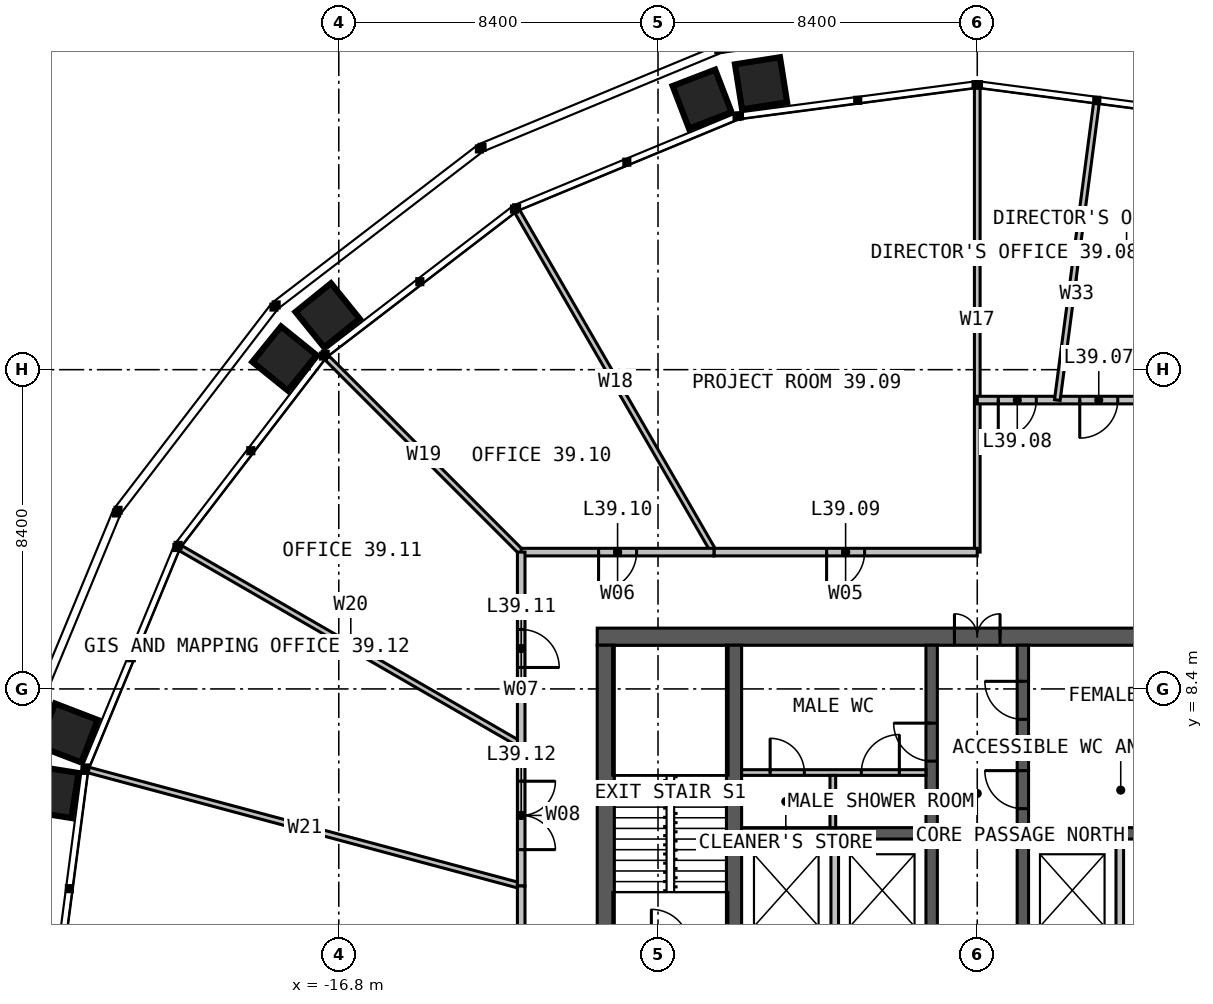
"""IFC4 building model, lengths in metres.
Left out: names, types, materials, properties, quantities, classifications, styles, units other than length and angle.
Written with IfcOpenShell. Run it as: python <this file> out.ifc"""

import sys

from ifc_helpers import new_model, si_unit, direction, frame, frame_2d, origin, place, context, subcontext, project, spatial, rectangle, extrude, element, fill, save


model = new_model("IFC4")
c1 = context("Model", 3, precision=1e-05, world=origin(), true_north=direction((0.0, 1.0)))
c2 = subcontext(c1, "Body", "Model", "MODEL_VIEW")
j1 = project(units=[si_unit("LENGTHUNIT", "METRE"), si_unit("PLANEANGLEUNIT", "RADIAN")], contexts=[c1])
p1 = place(None, origin())
s1 = spatial("IfcSite", under=j1, at=p1, CompositionType="ELEMENT")
p2 = place(p1, origin())
s2 = spatial("IfcBuilding", under=s1, at=p2, CompositionType="ELEMENT")
p3 = place(p2, frame((0.0, 0.0, 163.0)))
s3 = spatial("IfcBuildingStorey", under=s2, at=p3, CompositionType="ELEMENT", Elevation=163.0)
p4 = place(p3, frame((-10.0, 9.775, 0.0), z_axis=(0.0, 0.0, 1.0), x_axis=(1.0, 0.0, 0.0)))
e1 = element("IfcWall", 1, at=p4, inside=s3, PredefinedType="SOLIDWALL", context=c2, shape_type="SweptSolid", body=[
    extrude(rectangle(XDim=20.0, YDim=0.45, at=frame_2d((10.0, 0.0))), origin(), (0.0, 0.0, 1.0), 4.0),
])
p5 = place(p4, frame((9.4, 0.0, 0.0)))
e2 = element("IfcOpeningElement", 2, at=p5, cuts=e1, PredefinedType="OPENING", context=c2, shape_type="SweptSolid", body=[
    extrude(rectangle(XDim=1.2, YDim=2.2, at=frame_2d((0.6, 1.1))), frame((0.0, 0.235, 0.0), z_axis=(0.0, -1.0, 0.0), x_axis=(1.0, 0.0, 0.0)), (0.0, 0.0, 1.0), 0.47),
])
p6 = place(p3, frame((-9.775, 9.55, 0.0), z_axis=(0.0, 0.0, 1.0), x_axis=(0.0, -1.0, 0.0)))
e3 = element("IfcWall", 3, at=p6, inside=s3, PredefinedType="SOLIDWALL", context=c2, shape_type="SweptSolid", body=[
    extrude(rectangle(XDim=19.1, YDim=0.45, at=frame_2d((9.55, 0.0))), origin(), (0.0, 0.0, 1.0), 4.0),
])
p7 = place(p3, frame((-6.4, -9.55, 0.0), z_axis=(0.0, 0.0, 1.0), x_axis=(0.0, 1.0, 0.0)))
e4 = element("IfcWall", 4, at=p7, inside=s3, PredefinedType="SOLIDWALL", context=c2, shape_type="SweptSolid", body=[
    extrude(rectangle(XDim=19.1, YDim=0.4, at=frame_2d((9.55, 0.0))), origin(), (0.0, 0.0, 1.0), 4.0),
])
p8 = place(p7, frame((9.05, 0.0, 0.0)))
e5 = element("IfcOpeningElement", 5, at=p8, cuts=e4, PredefinedType="OPENING", context=c2, shape_type="SweptSolid", body=[
    extrude(rectangle(XDim=1.0, YDim=2.2, at=frame_2d((0.5, 1.1))), frame((0.0, 0.21, 0.0), z_axis=(0.0, -1.0, 0.0), x_axis=(1.0, 0.0, 0.0)), (0.0, 0.0, 1.0), 0.42),
])
for number, where, z_axis, x_axis in (
    (6, (-6.2, 4.6, 0.0), (0.0, 0.0, 1.0), (1.0, 0.0, 0.0)),
    (7, (1.35, 4.6, 0.0), (0.0, 0.0, 1.0), (1.0, 0.0, 0.0)),
):
    element("IfcWall", number, at=place(p3, frame(where, z_axis=z_axis, x_axis=x_axis)), inside=s3, PredefinedType="SOLIDWALL", context=c2, shape_type="SweptSolid", body=[
        extrude(rectangle(XDim=4.85, YDim=0.3, at=frame_2d((2.425, 0.0))), origin(), (0.0, 0.0, 1.0), 4.0),
    ])
p9 = place(p3, frame((-1.2, 1.45, 0.0), z_axis=(0.0, 0.0, 1.0), x_axis=(0.0, 1.0, 0.0)))
e8 = element("IfcWall", 8, at=p9, inside=s3, PredefinedType="SOLIDWALL", context=c2, shape_type="SweptSolid", body=[
    extrude(rectangle(XDim=8.1, YDim=0.3, at=frame_2d((4.05, 0.0))), origin(), (0.0, 0.0, 1.0), 4.0),
])
p10 = place(p9, frame((5.05, 0.0, 0.0)))
e9 = element("IfcOpeningElement", 9, at=p10, cuts=e8, PredefinedType="OPENING", context=c2, shape_type="SweptSolid", body=[
    extrude(rectangle(XDim=1.0, YDim=2.2, at=frame_2d((0.5, 1.1))), frame((0.0, 0.16, 0.0), z_axis=(0.0, -1.0, 0.0), x_axis=(1.0, 0.0, 0.0)), (0.0, 0.0, 1.0), 0.32),
])
p11 = place(p3, frame((1.2, 1.45, 0.0), z_axis=(0.0, 0.0, 1.0), x_axis=(0.0, 1.0, 0.0)))
e10 = element("IfcWall", 10, at=p11, inside=s3, PredefinedType="SOLIDWALL", context=c2, shape_type="SweptSolid", body=[
    extrude(rectangle(XDim=8.1, YDim=0.3, at=frame_2d((4.05, 0.0))), origin(), (0.0, 0.0, 1.0), 4.0),
])
p12 = place(p11, frame((3.8, 0.0, 0.0)))
e11 = element("IfcOpeningElement", 11, at=p12, cuts=e10, PredefinedType="OPENING", context=c2, shape_type="SweptSolid", body=[
    extrude(rectangle(XDim=1.0, YDim=2.2, at=frame_2d((0.5, 1.1))), frame((0.0, 0.16, 0.0), z_axis=(0.0, -1.0, 0.0), x_axis=(1.0, 0.0, 0.0)), (0.0, 0.0, 1.0), 0.32),
])
p13 = place(p11, frame((6.15, 0.0, 0.0)))
e12 = element("IfcOpeningElement", 12, at=p13, cuts=e10, PredefinedType="OPENING", context=c2, shape_type="SweptSolid", body=[
    extrude(rectangle(XDim=1.0, YDim=2.2, at=frame_2d((0.5, 1.1))), frame((0.0, 0.16, 0.0), z_axis=(0.0, -1.0, 0.0), x_axis=(1.0, 0.0, 0.0)), (0.0, 0.0, 1.0), 0.32),
])
for number, where, z_axis, x_axis in (
    (13, (-3.75, 1.75, 0.0), (0.0, 0.0, 1.0), (0.0, 1.0, 0.0)),
    (14, (3.75, 1.75, 0.0), (0.0, 0.0, 1.0), (0.0, 1.0, 0.0)),
):
    element("IfcWall", number, at=place(p3, frame(where, z_axis=z_axis, x_axis=x_axis)), inside=s3, PredefinedType="SOLIDWALL", context=c2, shape_type="SweptSolid", body=[
        extrude(rectangle(XDim=2.7, YDim=0.2, at=frame_2d((1.35, 0.0))), origin(), (0.0, 0.0, 1.0), 3.75),
    ])
p14 = place(p3, frame((1.35, 6.8, 0.0), z_axis=(0.0, 0.0, 1.0), x_axis=(1.0, 0.0, 0.0)))
e15 = element("IfcWall", 15, at=p14, inside=s3, PredefinedType="PARTITIONING", context=c2, shape_type="SweptSolid", body=[
    extrude(rectangle(XDim=4.85, YDim=0.15, at=frame_2d((2.425, 0.0))), origin(), (0.0, 0.0, 1.0), 3.75),
])
p15 = place(p3, frame((-6.2, 6.2, 0.0), z_axis=(0.0, 0.0, 1.0), x_axis=(1.0, 0.0, 0.0)))
e16 = element("IfcWall", 16, at=p15, inside=s3, PredefinedType="PARTITIONING", context=c2, shape_type="SweptSolid", body=[
    extrude(rectangle(XDim=4.85, YDim=0.15, at=frame_2d((2.425, 0.0))), origin(), (0.0, 0.0, 1.0), 3.75),
])
p16 = place(p15, frame((3.15, 0.0, 0.0)))
e17 = element("IfcOpeningElement", 17, at=p16, cuts=e16, PredefinedType="OPENING", context=c2, shape_type="SweptSolid", body=[
    extrude(rectangle(XDim=1.0, YDim=2.2, at=frame_2d((0.5, 1.1))), frame((0.0, 0.085, 0.0), z_axis=(0.0, -1.0, 0.0), x_axis=(1.0, 0.0, 0.0)), (0.0, 0.0, 1.0), 0.17),
])
p17 = place(p15, frame((0.75, 0.0, 0.0)))
e18 = element("IfcOpeningElement", 18, at=p17, cuts=e16, PredefinedType="OPENING", context=c2, shape_type="SweptSolid", body=[
    extrude(rectangle(XDim=0.9, YDim=2.2, at=frame_2d((0.45, 1.1))), frame((0.0, 0.085, 0.0), z_axis=(0.0, -1.0, 0.0), x_axis=(1.0, 0.0, 0.0)), (0.0, 0.0, 1.0), 0.17),
])
p18 = place(p3, frame((-3.8, 4.75, 0.0), z_axis=(0.0, 0.0, 1.0), x_axis=(0.0, 1.0, 0.0)))
e19 = element("IfcWall", 19, at=p18, inside=s3, PredefinedType="PARTITIONING", context=c2, shape_type="SweptSolid", body=[
    extrude(rectangle(XDim=1.375, YDim=0.15, at=frame_2d((0.688, 0.0))), origin(), (0.0, 0.0, 1.0), 3.75),
])
p19 = place(p3, frame((0.0, 12.0, 0.0), z_axis=(0.0, 0.0, 1.0), x_axis=(0.0, 1.0, 0.0)))
e20 = element("IfcWall", 20, at=p19, inside=s3, PredefinedType="PARTITIONING", context=c2, shape_type="SweptSolid", body=[
    extrude(rectangle(XDim=12.211, YDim=0.15, at=frame_2d((6.105, 0.0))), origin(), (0.0, 0.0, 1.0), 2.79),
])
p20 = place(p3, frame((-6.928, 12.0, 0.0), z_axis=(0.0, 0.0, 1.0), x_axis=(-0.500006140648, 0.86602185845, 0.0)))
e21 = element("IfcWall", 21, at=p20, inside=s3, PredefinedType="PARTITIONING", context=c2, shape_type="SweptSolid", body=[
    extrude(rectangle(XDim=10.355, YDim=0.15, at=frame_2d((5.177, 0.0))), origin(), (0.0, 0.0, 1.0), 2.79),
])
p21 = place(p3, frame((-12.0, 12.0, 0.0), z_axis=(0.0, 0.0, 1.0), x_axis=(-0.707106781187, 0.707106781187, 0.0)))
e22 = element("IfcWall", 22, at=p21, inside=s3, PredefinedType="PARTITIONING", context=c2, shape_type="SweptSolid", body=[
    extrude(rectangle(XDim=7.24, YDim=0.15, at=frame_2d((3.62, 0.0))), origin(), (0.0, 0.0, 1.0), 2.79),
])
p22 = place(p3, frame((-12.0, 6.928, 0.0), z_axis=(0.0, 0.0, 1.0), x_axis=(-0.86602185845, 0.500006140648, 0.0)))
e23 = element("IfcWall", 23, at=p22, inside=s3, PredefinedType="PARTITIONING", context=c2, shape_type="SweptSolid", body=[
    extrude(rectangle(XDim=10.355, YDim=0.15, at=frame_2d((5.177, 0.0))), origin(), (0.0, 0.0, 1.0), 2.79),
])
p23 = place(p3, frame((-12.0, 3.215, 0.0), z_axis=(0.0, 0.0, 1.0), x_axis=(-0.965923829901, 0.25882649561, 0.0)))
e24 = element("IfcWall", 24, at=p23, inside=s3, PredefinedType="PARTITIONING", context=c2, shape_type="SweptSolid", body=[
    extrude(rectangle(XDim=11.788, YDim=0.15, at=frame_2d((5.894, 0.0))), origin(), (0.0, 0.0, 1.0), 2.79),
])
p24 = place(p3, frame((9.238, 16.0, 0.0), z_axis=(0.0, 0.0, 1.0), x_axis=(-1.0, 0.0, 0.0)))
e25 = element("IfcWall", 25, at=p24, inside=s3, PredefinedType="PARTITIONING", context=c2, shape_type="SweptSolid", body=[
    extrude(rectangle(XDim=9.238, YDim=0.2, at=frame_2d((4.619, 0.0))), origin(), (0.0, 0.0, 1.0), 3.8),
])
p25 = place(p24, frame((0.805, 0.0, 0.0)))
e26 = element("IfcOpeningElement", 26, at=p25, cuts=e25, PredefinedType="OPENING", context=c2, shape_type="SweptSolid", body=[
    extrude(rectangle(XDim=1.0, YDim=2.2, at=frame_2d((0.5, 1.1))), frame((0.0, 0.11, 0.0), z_axis=(0.0, -1.0, 0.0), x_axis=(1.0, 0.0, 0.0)), (0.0, 0.0, 1.0), 0.22),
])
p26 = place(p24, frame((3.28, 0.0, 0.0)))
e27 = element("IfcOpeningElement", 27, at=p26, cuts=e25, PredefinedType="OPENING", context=c2, shape_type="SweptSolid", body=[
    extrude(rectangle(XDim=1.0, YDim=2.2, at=frame_2d((0.5, 1.1))), frame((0.0, 0.11, 0.0), z_axis=(0.0, -1.0, 0.0), x_axis=(1.0, 0.0, 0.0)), (0.0, 0.0, 1.0), 0.22),
])
p27 = place(p24, frame((5.541, 0.0, 0.0)))
e28 = element("IfcOpeningElement", 28, at=p27, cuts=e25, PredefinedType="OPENING", context=c2, shape_type="SweptSolid", body=[
    extrude(rectangle(XDim=1.0, YDim=2.2, at=frame_2d((0.5, 1.1))), frame((0.0, 0.11, 0.0), z_axis=(0.0, -1.0, 0.0), x_axis=(1.0, 0.0, 0.0)), (0.0, 0.0, 1.0), 0.22),
])
p28 = place(p24, frame((7.684, 0.0, 0.0)))
e29 = element("IfcOpeningElement", 29, at=p28, cuts=e25, PredefinedType="OPENING", context=c2, shape_type="SweptSolid", body=[
    extrude(rectangle(XDim=1.0, YDim=2.2, at=frame_2d((0.5, 1.1))), frame((0.0, 0.11, 0.0), z_axis=(0.0, -1.0, 0.0), x_axis=(1.0, 0.0, 0.0)), (0.0, 0.0, 1.0), 0.22),
])
p29 = place(p3, frame((2.106, 16.0, 0.0), z_axis=(0.0, 0.0, 1.0), x_axis=(0.130510712839, 0.99144689915, 0.0)))
e30 = element("IfcWall", 30, at=p29, inside=s3, PredefinedType="PARTITIONING", context=c2, shape_type="SweptSolid", body=[
    extrude(rectangle(XDim=7.866, YDim=0.15, at=frame_2d((3.933, 0.0))), origin(), (0.0, 0.0, 1.0), 2.79),
])
p30 = place(p3, frame((0.0, 12.0, 0.0), z_axis=(0.0, 0.0, 1.0), x_axis=(-1.0, 0.0, 0.0)))
e31 = element("IfcWall", 31, at=p30, inside=s3, PredefinedType="PARTITIONING", context=c2, shape_type="SweptSolid", body=[
    extrude(rectangle(XDim=6.928, YDim=0.2, at=frame_2d((3.464, 0.0))), origin(), (0.0, 0.0, 1.0), 3.8),
])
p31 = place(p30, frame((2.964, 0.0, 0.0)))
e32 = element("IfcOpeningElement", 32, at=p31, cuts=e31, PredefinedType="OPENING", context=c2, shape_type="SweptSolid", body=[
    extrude(rectangle(XDim=1.0, YDim=2.2, at=frame_2d((0.5, 1.1))), frame((0.0, 0.11, 0.0), z_axis=(0.0, -1.0, 0.0), x_axis=(1.0, 0.0, 0.0)), (0.0, 0.0, 1.0), 0.22),
])
p32 = place(p3, frame((-6.928, 12.0, 0.0), z_axis=(0.0, 0.0, 1.0), x_axis=(-1.0, 0.0, 0.0)))
e33 = element("IfcWall", 33, at=p32, inside=s3, PredefinedType="PARTITIONING", context=c2, shape_type="SweptSolid", body=[
    extrude(rectangle(XDim=5.072, YDim=0.2, at=frame_2d((2.536, 0.0))), origin(), (0.0, 0.0, 1.0), 3.8),
])
p33 = place(p32, frame((2.036, 0.0, 0.0)))
e34 = element("IfcOpeningElement", 34, at=p33, cuts=e33, PredefinedType="OPENING", context=c2, shape_type="SweptSolid", body=[
    extrude(rectangle(XDim=1.0, YDim=2.2, at=frame_2d((0.5, 1.1))), frame((0.0, 0.11, 0.0), z_axis=(0.0, -1.0, 0.0), x_axis=(1.0, 0.0, 0.0)), (0.0, 0.0, 1.0), 0.22),
])
p34 = place(p3, frame((-12.0, 12.0, 0.0), z_axis=(0.0, 0.0, 1.0), x_axis=(0.0, -1.0, 0.0)))
e35 = element("IfcWall", 35, at=p34, inside=s3, PredefinedType="PARTITIONING", context=c2, shape_type="SweptSolid", body=[
    extrude(rectangle(XDim=5.072, YDim=0.2, at=frame_2d((2.536, 0.0))), origin(), (0.0, 0.0, 1.0), 3.8),
])
p35 = place(p34, frame((2.036, 0.0, 0.0)))
e36 = element("IfcOpeningElement", 36, at=p35, cuts=e35, PredefinedType="OPENING", context=c2, shape_type="SweptSolid", body=[
    extrude(rectangle(XDim=1.0, YDim=2.2, at=frame_2d((0.5, 1.1))), frame((0.0, 0.11, 0.0), z_axis=(0.0, -1.0, 0.0), x_axis=(1.0, 0.0, 0.0)), (0.0, 0.0, 1.0), 0.22),
])
p36 = place(p3, frame((-12.0, 6.928, 0.0), z_axis=(0.0, 0.0, 1.0), x_axis=(0.0, -1.0, 0.0)))
e37 = element("IfcWall", 37, at=p36, inside=s3, PredefinedType="PARTITIONING", context=c2, shape_type="SweptSolid", body=[
    extrude(rectangle(XDim=3.713, YDim=0.2, at=frame_2d((1.856, 0.0))), origin(), (0.0, 0.0, 1.0), 3.8),
])
p37 = place(p36, frame((0.956, 0.0, 0.0)))
e38 = element("IfcOpeningElement", 38, at=p37, cuts=e37, PredefinedType="OPENING", context=c2, shape_type="SweptSolid", body=[
    extrude(rectangle(XDim=1.8, YDim=2.2, at=frame_2d((0.9, 1.1))), frame((0.0, 0.11, 0.0), z_axis=(0.0, -1.0, 0.0), x_axis=(1.0, 0.0, 0.0)), (0.0, 0.0, 1.0), 0.22),
])
p38 = place(p3, frame((-12.0, 3.215, 0.0), z_axis=(0.0, 0.0, 1.0), x_axis=(0.0, -1.0, 0.0)))
e39 = element("IfcWall", 39, at=p38, inside=s3, PredefinedType="PARTITIONING", context=c2, shape_type="SweptSolid", body=[
    extrude(rectangle(XDim=10.144, YDim=0.2, at=frame_2d((5.072, 0.0))), origin(), (0.0, 0.0, 1.0), 3.8),
])
p39 = place(p38, frame((4.172, 0.0, 0.0)))
e40 = element("IfcOpeningElement", 40, at=p39, cuts=e39, PredefinedType="OPENING", context=c2, shape_type="SweptSolid", body=[
    extrude(rectangle(XDim=1.8, YDim=2.2, at=frame_2d((0.9, 1.1))), frame((0.0, 0.11, 0.0), z_axis=(0.0, -1.0, 0.0), x_axis=(1.0, 0.0, 0.0)), (0.0, 0.0, 1.0), 0.22),
])
p40 = place(p5, origin())
e41 = element("IfcDoor", 41, at=p40, inside=s3, OperationType="DOUBLE_DOOR_SINGLE_SWING", PredefinedType="DOOR", context=c2, shape_type="SweptSolid", body=[
    extrude(rectangle(XDim=1.2, YDim=2.2, at=frame_2d((0.6, 1.1))), frame((0.0, 0.025, 0.0), z_axis=(0.0, -1.0, 0.0), x_axis=(1.0, 0.0, 0.0)), (0.0, 0.0, 1.0), 0.05),
])
fill(e2, e41)
p41 = place(p10, origin())
e42 = element("IfcDoor", 42, at=p41, inside=s3, OperationType="SINGLE_SWING_RIGHT", PredefinedType="DOOR", context=c2, shape_type="SweptSolid", body=[
    extrude(rectangle(XDim=1.0, YDim=2.2, at=frame_2d((0.5, 1.1))), frame((0.0, 0.025, 0.0), z_axis=(0.0, -1.0, 0.0), x_axis=(1.0, 0.0, 0.0)), (0.0, 0.0, 1.0), 0.05),
])
fill(e9, e42)
p42 = place(p12, origin())
e43 = element("IfcDoor", 43, at=p42, inside=s3, OperationType="SINGLE_SWING_RIGHT", PredefinedType="DOOR", context=c2, shape_type="SweptSolid", body=[
    extrude(rectangle(XDim=1.0, YDim=2.2, at=frame_2d((0.5, 1.1))), frame((0.0, 0.025, 0.0), z_axis=(0.0, -1.0, 0.0), x_axis=(1.0, 0.0, 0.0)), (0.0, 0.0, 1.0), 0.05),
])
fill(e11, e43)
p43 = place(p13, origin())
e44 = element("IfcDoor", 44, at=p43, inside=s3, OperationType="SINGLE_SWING_RIGHT", PredefinedType="DOOR", context=c2, shape_type="SweptSolid", body=[
    extrude(rectangle(XDim=1.0, YDim=2.2, at=frame_2d((0.5, 1.1))), frame((0.0, 0.025, 0.0), z_axis=(0.0, -1.0, 0.0), x_axis=(1.0, 0.0, 0.0)), (0.0, 0.0, 1.0), 0.05),
])
fill(e12, e44)
p44 = place(p16, origin())
e45 = element("IfcDoor", 45, at=p44, inside=s3, OperationType="SINGLE_SWING_RIGHT", PredefinedType="DOOR", context=c2, shape_type="SweptSolid", body=[
    extrude(rectangle(XDim=1.0, YDim=2.2, at=frame_2d((0.5, 1.1))), frame((0.0, 0.025, 0.0), z_axis=(0.0, -1.0, 0.0), x_axis=(1.0, 0.0, 0.0)), (0.0, 0.0, 1.0), 0.05),
])
fill(e17, e45)
p45 = place(p17, origin())
e46 = element("IfcDoor", 46, at=p45, inside=s3, OperationType="SINGLE_SWING_LEFT", PredefinedType="DOOR", context=c2, shape_type="SweptSolid", body=[
    extrude(rectangle(XDim=0.9, YDim=2.2, at=frame_2d((0.45, 1.1))), frame((0.0, 0.025, 0.0), z_axis=(0.0, -1.0, 0.0), x_axis=(1.0, 0.0, 0.0)), (0.0, 0.0, 1.0), 0.05),
])
fill(e18, e46)
p46 = place(p27, origin())
e47 = element("IfcDoor", 47, at=p46, inside=s3, OperationType="SINGLE_SWING_RIGHT", PredefinedType="DOOR", context=c2, shape_type="SweptSolid", body=[
    extrude(rectangle(XDim=1.0, YDim=2.2, at=frame_2d((0.5, 1.1))), frame((0.0, 0.025, 0.0), z_axis=(0.0, -1.0, 0.0), x_axis=(1.0, 0.0, 0.0)), (0.0, 0.0, 1.0), 0.05),
])
fill(e28, e47)
p47 = place(p28, origin())
e48 = element("IfcDoor", 48, at=p47, inside=s3, OperationType="SINGLE_SWING_RIGHT", PredefinedType="DOOR", context=c2, shape_type="SweptSolid", body=[
    extrude(rectangle(XDim=1.0, YDim=2.2, at=frame_2d((0.5, 1.1))), frame((0.0, 0.025, 0.0), z_axis=(0.0, -1.0, 0.0), x_axis=(1.0, 0.0, 0.0)), (0.0, 0.0, 1.0), 0.05),
])
fill(e29, e48)
p48 = place(p31, origin())
e49 = element("IfcDoor", 49, at=p48, inside=s3, OperationType="SINGLE_SWING_RIGHT", PredefinedType="DOOR", context=c2, shape_type="SweptSolid", body=[
    extrude(rectangle(XDim=1.0, YDim=2.2, at=frame_2d((0.5, 1.1))), frame((0.0, 0.025, 0.0), z_axis=(0.0, -1.0, 0.0), x_axis=(1.0, 0.0, 0.0)), (0.0, 0.0, 1.0), 0.05),
])
fill(e32, e49)
p49 = place(p33, origin())
e50 = element("IfcDoor", 50, at=p49, inside=s3, OperationType="SINGLE_SWING_RIGHT", PredefinedType="DOOR", context=c2, shape_type="SweptSolid", body=[
    extrude(rectangle(XDim=1.0, YDim=2.2, at=frame_2d((0.5, 1.1))), frame((0.0, 0.025, 0.0), z_axis=(0.0, -1.0, 0.0), x_axis=(1.0, 0.0, 0.0)), (0.0, 0.0, 1.0), 0.05),
])
fill(e34, e50)
p50 = place(p35, origin())
e51 = element("IfcDoor", 51, at=p50, inside=s3, OperationType="SINGLE_SWING_RIGHT", PredefinedType="DOOR", context=c2, shape_type="SweptSolid", body=[
    extrude(rectangle(XDim=1.0, YDim=2.2, at=frame_2d((0.5, 1.1))), frame((0.0, 0.025, 0.0), z_axis=(0.0, -1.0, 0.0), x_axis=(1.0, 0.0, 0.0)), (0.0, 0.0, 1.0), 0.05),
])
fill(e36, e51)
p51 = place(p37, origin())
e52 = element("IfcDoor", 52, at=p51, inside=s3, OperationType="DOUBLE_DOOR_SINGLE_SWING", PredefinedType="DOOR", context=c2, shape_type="SweptSolid", body=[
    extrude(rectangle(XDim=1.8, YDim=2.2, at=frame_2d((0.9, 1.1))), frame((0.0, 0.025, 0.0), z_axis=(0.0, -1.0, 0.0), x_axis=(1.0, 0.0, 0.0)), (0.0, 0.0, 1.0), 0.05),
])
fill(e38, e52)
save(model, sys.argv[1])
